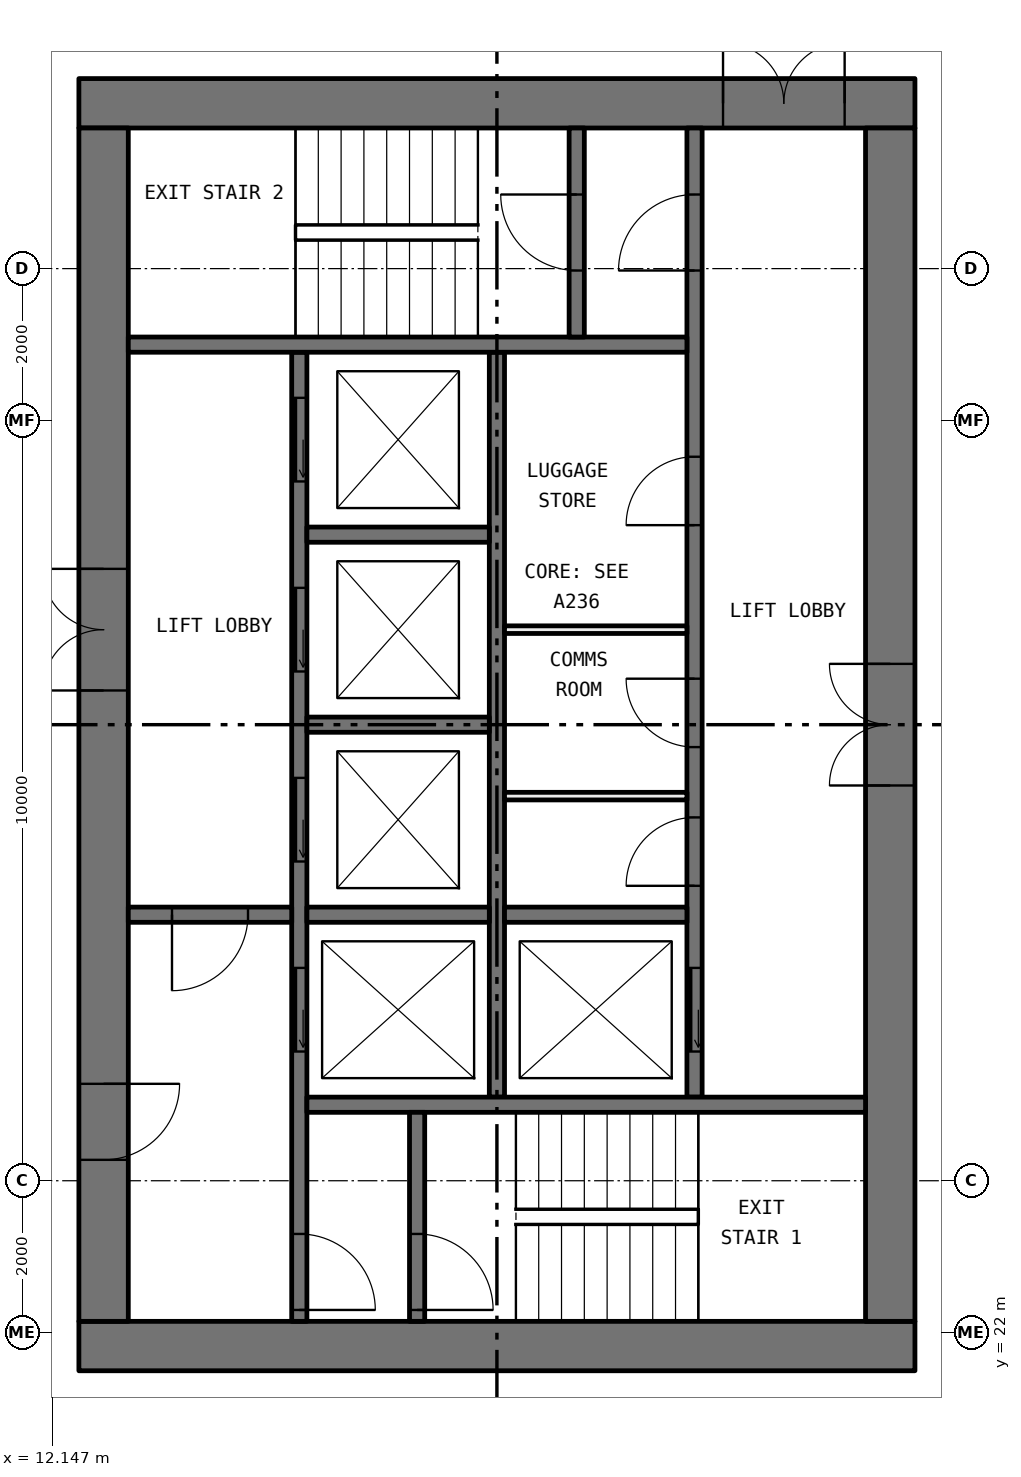
"""IFC4 building model, lengths in metres.
Left out: names, types, materials, properties, quantities, classifications, styles, units other than length and angle.
Written with IfcOpenShell. Run it as: python <this file> out.ifc"""

import sys

from ifc_helpers import new_model, si_unit, direction, frame, frame_2d, origin, place, context, subcontext, project, spatial, rectangle, extrude, element, fill, save


model = new_model("IFC4")
c1 = context("Model", 3, precision=1e-05, world=origin(), true_north=direction((0.0, 1.0)))
c2 = subcontext(c1, "Body", "Model", "MODEL_VIEW")
j1 = project(units=[si_unit("LENGTHUNIT", "METRE"), si_unit("PLANEANGLEUNIT", "RADIAN")], contexts=[c1])
p1 = place(None, origin())
s1 = spatial("IfcSite", under=j1, at=p1, CompositionType="ELEMENT")
p2 = place(p1, origin())
s2 = spatial("IfcBuilding", under=s1, at=p2, CompositionType="ELEMENT")
p3 = place(p2, frame((0.0, 0.0, 134.55)))
s3 = spatial("IfcBuildingStorey", under=s2, at=p3, CompositionType="ELEMENT", Elevation=134.55)
p4 = place(p3, frame((12.5, 21.825, 0.0), z_axis=(0.0, 0.0, 1.0), x_axis=(1.0, 0.0, 0.0)))
e1 = element("IfcWall", 1, at=p4, inside=s3, PredefinedType="SHEAR", context=c2, shape_type="SweptSolid", body=[
    extrude(rectangle(XDim=11.0, YDim=0.65, at=frame_2d((5.5, 0.0))), origin(), (0.0, 0.0, 1.0), 3.05),
])
p5 = place(p3, frame((12.5, 38.175, 0.0), z_axis=(0.0, 0.0, 1.0), x_axis=(1.0, 0.0, 0.0)))
e2 = element("IfcWall", 2, at=p5, inside=s3, PredefinedType="SHEAR", context=c2, shape_type="SweptSolid", body=[
    extrude(rectangle(XDim=11.0, YDim=0.65, at=frame_2d((5.5, 0.0))), origin(), (0.0, 0.0, 1.0), 3.05),
])
p6 = place(p5, frame((8.475, 0.0, 0.0)))
e3 = element("IfcOpeningElement", 3, at=p6, cuts=e2, PredefinedType="OPENING", context=c2, shape_type="SweptSolid", body=[
    extrude(rectangle(XDim=1.6, YDim=2.1, at=frame_2d((0.8, 1.05))), frame((0.0, 0.335, 0.0), z_axis=(0.0, -1.0, 0.0), x_axis=(1.0, 0.0, 0.0)), (0.0, 0.0, 1.0), 0.67),
])
p7 = place(p3, frame((12.825, 22.15, 0.0), z_axis=(0.0, 0.0, 1.0), x_axis=(0.0, 1.0, 0.0)))
e4 = element("IfcWall", 4, at=p7, inside=s3, PredefinedType="SHEAR", context=c2, shape_type="SweptSolid", body=[
    extrude(rectangle(XDim=15.7, YDim=0.65, at=frame_2d((7.85, 0.0))), origin(), (0.0, 0.0, 1.0), 3.05),
])
p8 = place(p7, frame((8.3, 0.0, 0.0)))
e5 = element("IfcOpeningElement", 5, at=p8, cuts=e4, PredefinedType="OPENING", context=c2, shape_type="SweptSolid", body=[
    extrude(rectangle(XDim=1.6, YDim=2.1, at=frame_2d((0.8, 1.05))), frame((0.0, 0.335, 0.0), z_axis=(0.0, -1.0, 0.0), x_axis=(1.0, 0.0, 0.0)), (0.0, 0.0, 1.0), 0.67),
])
p9 = place(p7, frame((2.125, 0.0, 0.0)))
e6 = element("IfcOpeningElement", 6, at=p9, cuts=e4, PredefinedType="OPENING", context=c2, shape_type="SweptSolid", body=[
    extrude(rectangle(XDim=1.0, YDim=2.1, at=frame_2d((0.5, 1.05))), frame((0.0, 0.335, 0.0), z_axis=(0.0, -1.0, 0.0), x_axis=(1.0, 0.0, 0.0)), (0.0, 0.0, 1.0), 0.67),
])
p10 = place(p3, frame((23.175, 22.15, 0.0), z_axis=(0.0, 0.0, 1.0), x_axis=(0.0, 1.0, 0.0)))
e7 = element("IfcWall", 7, at=p10, inside=s3, PredefinedType="SHEAR", context=c2, shape_type="SweptSolid", body=[
    extrude(rectangle(XDim=15.7, YDim=0.65, at=frame_2d((7.85, 0.0))), origin(), (0.0, 0.0, 1.0), 3.05),
])
p11 = place(p10, frame((7.05, 0.0, 0.0)))
e8 = element("IfcOpeningElement", 8, at=p11, cuts=e7, PredefinedType="OPENING", context=c2, shape_type="SweptSolid", body=[
    extrude(rectangle(XDim=1.6, YDim=2.1, at=frame_2d((0.8, 1.05))), frame((0.0, 0.335, 0.0), z_axis=(0.0, -1.0, 0.0), x_axis=(1.0, 0.0, 0.0)), (0.0, 0.0, 1.0), 0.67),
])
p12 = place(p3, frame((15.4, 22.15, 0.0), z_axis=(0.0, 0.0, 1.0), x_axis=(0.0, 1.0, 0.0)))
e9 = element("IfcWall", 9, at=p12, inside=s3, PredefinedType="SOLIDWALL", context=c2, shape_type="SweptSolid", body=[
    extrude(rectangle(XDim=12.75, YDim=0.2, at=frame_2d((6.375, 0.0))), origin(), (0.0, 0.0, 1.0), 3.05),
])
p13 = place(p12, frame((3.55, 0.0, 0.0)))
e10 = element("IfcOpeningElement", 10, at=p13, cuts=e9, PredefinedType="OPENING", context=c2, shape_type="SweptSolid", body=[
    extrude(rectangle(XDim=1.1, YDim=2.1, at=frame_2d((0.55, 1.05))), frame((0.0, 0.11, 0.0), z_axis=(0.0, -1.0, 0.0), x_axis=(1.0, 0.0, 0.0)), (0.0, 0.0, 1.0), 0.22),
])
p14 = place(p12, frame((6.05, 0.0, 0.0)))
e11 = element("IfcOpeningElement", 11, at=p14, cuts=e9, PredefinedType="OPENING", context=c2, shape_type="SweptSolid", body=[
    extrude(rectangle(XDim=1.1, YDim=2.1, at=frame_2d((0.55, 1.05))), frame((0.0, 0.11, 0.0), z_axis=(0.0, -1.0, 0.0), x_axis=(1.0, 0.0, 0.0)), (0.0, 0.0, 1.0), 0.22),
])
p15 = place(p12, frame((8.55, 0.0, 0.0)))
e12 = element("IfcOpeningElement", 12, at=p15, cuts=e9, PredefinedType="OPENING", context=c2, shape_type="SweptSolid", body=[
    extrude(rectangle(XDim=1.1, YDim=2.1, at=frame_2d((0.55, 1.05))), frame((0.0, 0.11, 0.0), z_axis=(0.0, -1.0, 0.0), x_axis=(1.0, 0.0, 0.0)), (0.0, 0.0, 1.0), 0.22),
])
p16 = place(p12, frame((11.05, 0.0, 0.0)))
e13 = element("IfcOpeningElement", 13, at=p16, cuts=e9, PredefinedType="OPENING", context=c2, shape_type="SweptSolid", body=[
    extrude(rectangle(XDim=1.1, YDim=2.1, at=frame_2d((0.55, 1.05))), frame((0.0, 0.11, 0.0), z_axis=(0.0, -1.0, 0.0), x_axis=(1.0, 0.0, 0.0)), (0.0, 0.0, 1.0), 0.22),
])
p17 = place(p12, frame((0.15, 0.0, 0.0)))
e14 = element("IfcOpeningElement", 14, at=p17, cuts=e9, PredefinedType="OPENING", context=c2, shape_type="SweptSolid", body=[
    extrude(rectangle(XDim=1.0, YDim=2.1, at=frame_2d((0.5, 1.05))), frame((0.0, 0.11, 0.0), z_axis=(0.0, -1.0, 0.0), x_axis=(1.0, 0.0, 0.0)), (0.0, 0.0, 1.0), 0.22),
])
p18 = place(p3, frame((20.6, 25.1, 0.0), z_axis=(0.0, 0.0, 1.0), x_axis=(0.0, 1.0, 0.0)))
e15 = element("IfcWall", 15, at=p18, inside=s3, PredefinedType="SOLIDWALL", context=c2, shape_type="SweptSolid", body=[
    extrude(rectangle(XDim=12.75, YDim=0.2, at=frame_2d((6.375, 0.0))), origin(), (0.0, 0.0, 1.0), 3.05),
])
p19 = place(p18, frame((0.6, 0.0, 0.0)))
e16 = element("IfcOpeningElement", 16, at=p19, cuts=e15, PredefinedType="OPENING", context=c2, shape_type="SweptSolid", body=[
    extrude(rectangle(XDim=1.1, YDim=2.1, at=frame_2d((0.55, 1.05))), frame((0.0, 0.11, 0.0), z_axis=(0.0, -1.0, 0.0), x_axis=(1.0, 0.0, 0.0)), (0.0, 0.0, 1.0), 0.22),
])
p20 = place(p18, frame((10.875, 0.0, 0.0)))
e17 = element("IfcOpeningElement", 17, at=p20, cuts=e15, PredefinedType="OPENING", context=c2, shape_type="SweptSolid", body=[
    extrude(rectangle(XDim=1.0, YDim=2.1, at=frame_2d((0.5, 1.05))), frame((0.0, 0.11, 0.0), z_axis=(0.0, -1.0, 0.0), x_axis=(1.0, 0.0, 0.0)), (0.0, 0.0, 1.0), 0.22),
])
p21 = place(p18, frame((2.78, 0.0, 0.0)))
e18 = element("IfcOpeningElement", 18, at=p21, cuts=e15, PredefinedType="OPENING", context=c2, shape_type="SweptSolid", body=[
    extrude(rectangle(XDim=0.9, YDim=2.1, at=frame_2d((0.45, 1.05))), frame((0.0, 0.11, 0.0), z_axis=(0.0, -1.0, 0.0), x_axis=(1.0, 0.0, 0.0)), (0.0, 0.0, 1.0), 0.22),
])
p22 = place(p18, frame((4.605, 0.0, 0.0)))
e19 = element("IfcOpeningElement", 19, at=p22, cuts=e15, PredefinedType="OPENING", context=c2, shape_type="SweptSolid", body=[
    extrude(rectangle(XDim=0.9, YDim=2.1, at=frame_2d((0.45, 1.05))), frame((0.0, 0.11, 0.0), z_axis=(0.0, -1.0, 0.0), x_axis=(1.0, 0.0, 0.0)), (0.0, 0.0, 1.0), 0.22),
])
p23 = place(p18, frame((7.525, 0.0, 0.0)))
e20 = element("IfcOpeningElement", 20, at=p23, cuts=e15, PredefinedType="OPENING", context=c2, shape_type="SweptSolid", body=[
    extrude(rectangle(XDim=0.9, YDim=2.1, at=frame_2d((0.45, 1.05))), frame((0.0, 0.11, 0.0), z_axis=(0.0, -1.0, 0.0), x_axis=(1.0, 0.0, 0.0)), (0.0, 0.0, 1.0), 0.22),
])
p24 = place(p3, frame((18.0, 25.1, 0.0), z_axis=(0.0, 0.0, 1.0), x_axis=(0.0, 1.0, 0.0)))
e21 = element("IfcWall", 21, at=p24, inside=s3, PredefinedType="SOLIDWALL", context=c2, shape_type="SweptSolid", body=[
    extrude(rectangle(XDim=9.8, YDim=0.2, at=frame_2d((4.9, 0.0))), origin(), (0.0, 0.0, 1.0), 3.05),
])
for number, where, z_axis, x_axis in (
    (22, (15.5, 25.0, 0.0), (0.0, 0.0, 1.0), (1.0, 0.0, 0.0)),
    (23, (13.15, 35.0, 0.0), (0.0, 0.0, 1.0), (1.0, 0.0, 0.0)),
):
    element("IfcWall", number, at=place(p3, frame(where, z_axis=z_axis, x_axis=x_axis)), inside=s3, PredefinedType="SOLIDWALL", context=c2, shape_type="SweptSolid", body=[
        extrude(rectangle(XDim=7.35, YDim=0.2, at=frame_2d((3.675, 0.0))), origin(), (0.0, 0.0, 1.0), 3.05),
    ])
p25 = place(p3, frame((13.15, 27.5, 0.0), z_axis=(0.0, 0.0, 1.0), x_axis=(1.0, 0.0, 0.0)))
e24 = element("IfcWall", 24, at=p25, inside=s3, PredefinedType="SOLIDWALL", context=c2, shape_type="SweptSolid", body=[
    extrude(rectangle(XDim=2.15, YDim=0.2, at=frame_2d((1.075, 0.0))), origin(), (0.0, 0.0, 1.0), 3.05),
])
p26 = place(p25, frame((0.575, 0.0, 0.0)))
e25 = element("IfcOpeningElement", 25, at=p26, cuts=e24, PredefinedType="OPENING", context=c2, shape_type="SweptSolid", body=[
    extrude(rectangle(XDim=1.0, YDim=2.1, at=frame_2d((0.5, 1.05))), frame((0.0, 0.11, 0.0), z_axis=(0.0, -1.0, 0.0), x_axis=(1.0, 0.0, 0.0)), (0.0, 0.0, 1.0), 0.22),
])
p27 = place(p3, frame((16.95, 22.15, 0.0), z_axis=(0.0, 0.0, 1.0), x_axis=(0.0, 1.0, 0.0)))
e26 = element("IfcWall", 26, at=p27, inside=s3, PredefinedType="SOLIDWALL", context=c2, shape_type="SweptSolid", body=[
    extrude(rectangle(XDim=2.75, YDim=0.2, at=frame_2d((1.375, 0.0))), origin(), (0.0, 0.0, 1.0), 3.05),
])
p28 = place(p27, frame((0.15, 0.0, 0.0)))
e27 = element("IfcOpeningElement", 27, at=p28, cuts=e26, PredefinedType="OPENING", context=c2, shape_type="SweptSolid", body=[
    extrude(rectangle(XDim=1.0, YDim=2.1, at=frame_2d((0.5, 1.05))), frame((0.0, 0.11, 0.0), z_axis=(0.0, -1.0, 0.0), x_axis=(1.0, 0.0, 0.0)), (0.0, 0.0, 1.0), 0.22),
])
p29 = place(p3, frame((19.05, 35.1, 0.0), z_axis=(0.0, 0.0, 1.0), x_axis=(0.0, 1.0, 0.0)))
e28 = element("IfcWall", 28, at=p29, inside=s3, PredefinedType="SOLIDWALL", context=c2, shape_type="SweptSolid", body=[
    extrude(rectangle(XDim=2.75, YDim=0.2, at=frame_2d((1.375, 0.0))), origin(), (0.0, 0.0, 1.0), 3.05),
])
p30 = place(p29, frame((0.875, 0.0, 0.0)))
e29 = element("IfcOpeningElement", 29, at=p30, cuts=e28, PredefinedType="OPENING", context=c2, shape_type="SweptSolid", body=[
    extrude(rectangle(XDim=1.0, YDim=2.1, at=frame_2d((0.5, 1.05))), frame((0.0, 0.11, 0.0), z_axis=(0.0, -1.0, 0.0), x_axis=(1.0, 0.0, 0.0)), (0.0, 0.0, 1.0), 0.22),
])
for number, where, z_axis, x_axis in (
    (30, (15.5, 27.5, 0.0), (0.0, 0.0, 1.0), (1.0, 0.0, 0.0)),
    (31, (15.5, 30.0, 0.0), (0.0, 0.0, 1.0), (1.0, 0.0, 0.0)),
    (32, (15.5, 32.5, 0.0), (0.0, 0.0, 1.0), (1.0, 0.0, 0.0)),
    (33, (18.1, 27.5, 0.0), (0.0, 0.0, 1.0), (1.0, 0.0, 0.0)),
):
    element("IfcWall", number, at=place(p3, frame(where, z_axis=z_axis, x_axis=x_axis)), inside=s3, PredefinedType="SOLIDWALL", context=c2, shape_type="SweptSolid", body=[
        extrude(rectangle(XDim=2.4, YDim=0.2, at=frame_2d((1.2, 0.0))), origin(), (0.0, 0.0, 1.0), 3.05),
    ])
for number, where, z_axis, x_axis in (
    (34, (18.1, 29.06, 0.0), (0.0, 0.0, 1.0), (1.0, 0.0, 0.0)),
    (35, (18.1, 31.25, 0.0), (0.0, 0.0, 1.0), (1.0, 0.0, 0.0)),
):
    element("IfcWall", number, at=place(p3, frame(where, z_axis=z_axis, x_axis=x_axis)), inside=s3, PredefinedType="PARTITIONING", context=c2, shape_type="SweptSolid", body=[
        extrude(rectangle(XDim=2.4, YDim=0.1, at=frame_2d((1.2, 0.0))), origin(), (0.0, 0.0, 1.0), 3.05),
    ])
p31 = place(p19, origin())
e36 = element("IfcDoor", 36, at=p31, inside=s3, OperationType="SLIDING_TO_LEFT", PredefinedType="DOOR", context=c2, shape_type="SweptSolid", body=[
    extrude(rectangle(XDim=1.1, YDim=2.1, at=frame_2d((0.55, 1.05))), frame((0.0, 0.025, 0.0), z_axis=(0.0, -1.0, 0.0), x_axis=(1.0, 0.0, 0.0)), (0.0, 0.0, 1.0), 0.05),
])
fill(e16, e36)
p32 = place(p13, origin())
e37 = element("IfcDoor", 37, at=p32, inside=s3, OperationType="SLIDING_TO_LEFT", PredefinedType="DOOR", context=c2, shape_type="SweptSolid", body=[
    extrude(rectangle(XDim=1.1, YDim=2.1, at=frame_2d((0.55, 1.05))), frame((0.0, 0.025, 0.0), z_axis=(0.0, -1.0, 0.0), x_axis=(1.0, 0.0, 0.0)), (0.0, 0.0, 1.0), 0.05),
])
fill(e10, e37)
p33 = place(p14, origin())
e38 = element("IfcDoor", 38, at=p33, inside=s3, OperationType="SLIDING_TO_LEFT", PredefinedType="DOOR", context=c2, shape_type="SweptSolid", body=[
    extrude(rectangle(XDim=1.1, YDim=2.1, at=frame_2d((0.55, 1.05))), frame((0.0, 0.025, 0.0), z_axis=(0.0, -1.0, 0.0), x_axis=(1.0, 0.0, 0.0)), (0.0, 0.0, 1.0), 0.05),
])
fill(e11, e38)
p34 = place(p15, origin())
e39 = element("IfcDoor", 39, at=p34, inside=s3, OperationType="SLIDING_TO_LEFT", PredefinedType="DOOR", context=c2, shape_type="SweptSolid", body=[
    extrude(rectangle(XDim=1.1, YDim=2.1, at=frame_2d((0.55, 1.05))), frame((0.0, 0.025, 0.0), z_axis=(0.0, -1.0, 0.0), x_axis=(1.0, 0.0, 0.0)), (0.0, 0.0, 1.0), 0.05),
])
fill(e12, e39)
p35 = place(p16, origin())
e40 = element("IfcDoor", 40, at=p35, inside=s3, OperationType="SLIDING_TO_LEFT", PredefinedType="DOOR", context=c2, shape_type="SweptSolid", body=[
    extrude(rectangle(XDim=1.1, YDim=2.1, at=frame_2d((0.55, 1.05))), frame((0.0, 0.025, 0.0), z_axis=(0.0, -1.0, 0.0), x_axis=(1.0, 0.0, 0.0)), (0.0, 0.0, 1.0), 0.05),
])
fill(e13, e40)
p36 = place(p28, frame((1.0, 0.0, 0.0), x_axis=(-1.0, 0.0, 0.0)))
e41 = element("IfcDoor", 41, at=p36, inside=s3, OperationType="SINGLE_SWING_LEFT", PredefinedType="DOOR", context=c2, shape_type="SweptSolid", body=[
    extrude(rectangle(XDim=1.0, YDim=2.1, at=frame_2d((0.5, 1.05))), frame((0.0, 0.025, 0.0), z_axis=(0.0, -1.0, 0.0), x_axis=(1.0, 0.0, 0.0)), (0.0, 0.0, 1.0), 0.05),
])
fill(e27, e41)
p37 = place(p17, frame((1.0, 0.0, 0.0), x_axis=(-1.0, 0.0, 0.0)))
e42 = element("IfcDoor", 42, at=p37, inside=s3, OperationType="SINGLE_SWING_LEFT", PredefinedType="DOOR", context=c2, shape_type="SweptSolid", body=[
    extrude(rectangle(XDim=1.0, YDim=2.1, at=frame_2d((0.5, 1.05))), frame((0.0, 0.025, 0.0), z_axis=(0.0, -1.0, 0.0), x_axis=(1.0, 0.0, 0.0)), (0.0, 0.0, 1.0), 0.05),
])
fill(e14, e42)
p38 = place(p20, origin())
e43 = element("IfcDoor", 43, at=p38, inside=s3, OperationType="SINGLE_SWING_RIGHT", PredefinedType="DOOR", context=c2, shape_type="SweptSolid", body=[
    extrude(rectangle(XDim=1.0, YDim=2.1, at=frame_2d((0.5, 1.05))), frame((0.0, 0.025, 0.0), z_axis=(0.0, -1.0, 0.0), x_axis=(1.0, 0.0, 0.0)), (0.0, 0.0, 1.0), 0.05),
])
fill(e17, e43)
p39 = place(p30, origin())
e44 = element("IfcDoor", 44, at=p39, inside=s3, OperationType="SINGLE_SWING_LEFT", PredefinedType="DOOR", context=c2, shape_type="SweptSolid", body=[
    extrude(rectangle(XDim=1.0, YDim=2.1, at=frame_2d((0.5, 1.05))), frame((0.0, 0.025, 0.0), z_axis=(0.0, -1.0, 0.0), x_axis=(1.0, 0.0, 0.0)), (0.0, 0.0, 1.0), 0.05),
])
fill(e29, e44)
p40 = place(p26, frame((1.0, 0.0, 0.0), x_axis=(-1.0, 0.0, 0.0)))
e45 = element("IfcDoor", 45, at=p40, inside=s3, OperationType="SINGLE_SWING_LEFT", PredefinedType="DOOR", context=c2, shape_type="SweptSolid", body=[
    extrude(rectangle(XDim=1.0, YDim=2.1, at=frame_2d((0.5, 1.05))), frame((0.0, 0.025, 0.0), z_axis=(0.0, -1.0, 0.0), x_axis=(1.0, 0.0, 0.0)), (0.0, 0.0, 1.0), 0.05),
])
fill(e25, e45)
p41 = place(p8, origin())
e46 = element("IfcDoor", 46, at=p41, inside=s3, OperationType="DOUBLE_DOOR_SINGLE_SWING", PredefinedType="DOOR", context=c2, shape_type="SweptSolid", body=[
    extrude(rectangle(XDim=1.6, YDim=2.1, at=frame_2d((0.8, 1.05))), frame((0.0, 0.025, 0.0), z_axis=(0.0, -1.0, 0.0), x_axis=(1.0, 0.0, 0.0)), (0.0, 0.0, 1.0), 0.05),
])
fill(e5, e46)
p42 = place(p9, frame((1.0, 0.0, 0.0), x_axis=(-1.0, 0.0, 0.0)))
e47 = element("IfcDoor", 47, at=p42, inside=s3, OperationType="SINGLE_SWING_RIGHT", PredefinedType="DOOR", context=c2, shape_type="SweptSolid", body=[
    extrude(rectangle(XDim=1.0, YDim=2.1, at=frame_2d((0.5, 1.05))), frame((0.0, 0.025, 0.0), z_axis=(0.0, -1.0, 0.0), x_axis=(1.0, 0.0, 0.0)), (0.0, 0.0, 1.0), 0.05),
])
fill(e6, e47)
p43 = place(p6, origin())
e48 = element("IfcDoor", 48, at=p43, inside=s3, OperationType="DOUBLE_DOOR_SINGLE_SWING", PredefinedType="DOOR", context=c2, shape_type="SweptSolid", body=[
    extrude(rectangle(XDim=1.6, YDim=2.1, at=frame_2d((0.8, 1.05))), frame((0.0, 0.025, 0.0), z_axis=(0.0, -1.0, 0.0), x_axis=(1.0, 0.0, 0.0)), (0.0, 0.0, 1.0), 0.05),
])
fill(e3, e48)
p44 = place(p11, origin())
e49 = element("IfcDoor", 49, at=p44, inside=s3, OperationType="DOUBLE_DOOR_SINGLE_SWING", PredefinedType="DOOR", context=c2, shape_type="SweptSolid", body=[
    extrude(rectangle(XDim=1.6, YDim=2.1, at=frame_2d((0.8, 1.05))), frame((0.0, 0.025, 0.0), z_axis=(0.0, -1.0, 0.0), x_axis=(1.0, 0.0, 0.0)), (0.0, 0.0, 1.0), 0.05),
])
fill(e8, e49)
p45 = place(p21, origin())
e50 = element("IfcDoor", 50, at=p45, inside=s3, OperationType="SINGLE_SWING_RIGHT", PredefinedType="DOOR", context=c2, shape_type="SweptSolid", body=[
    extrude(rectangle(XDim=0.9, YDim=2.1, at=frame_2d((0.45, 1.05))), frame((0.0, 0.025, 0.0), z_axis=(0.0, -1.0, 0.0), x_axis=(1.0, 0.0, 0.0)), (0.0, 0.0, 1.0), 0.05),
])
fill(e18, e50)
p46 = place(p22, origin())
e51 = element("IfcDoor", 51, at=p46, inside=s3, OperationType="SINGLE_SWING_LEFT", PredefinedType="DOOR", context=c2, shape_type="SweptSolid", body=[
    extrude(rectangle(XDim=0.9, YDim=2.1, at=frame_2d((0.45, 1.05))), frame((0.0, 0.025, 0.0), z_axis=(0.0, -1.0, 0.0), x_axis=(1.0, 0.0, 0.0)), (0.0, 0.0, 1.0), 0.05),
])
fill(e19, e51)
p47 = place(p23, origin())
e52 = element("IfcDoor", 52, at=p47, inside=s3, OperationType="SINGLE_SWING_RIGHT", PredefinedType="DOOR", context=c2, shape_type="SweptSolid", body=[
    extrude(rectangle(XDim=0.9, YDim=2.1, at=frame_2d((0.45, 1.05))), frame((0.0, 0.025, 0.0), z_axis=(0.0, -1.0, 0.0), x_axis=(1.0, 0.0, 0.0)), (0.0, 0.0, 1.0), 0.05),
])
fill(e20, e52)
save(model, sys.argv[1])
